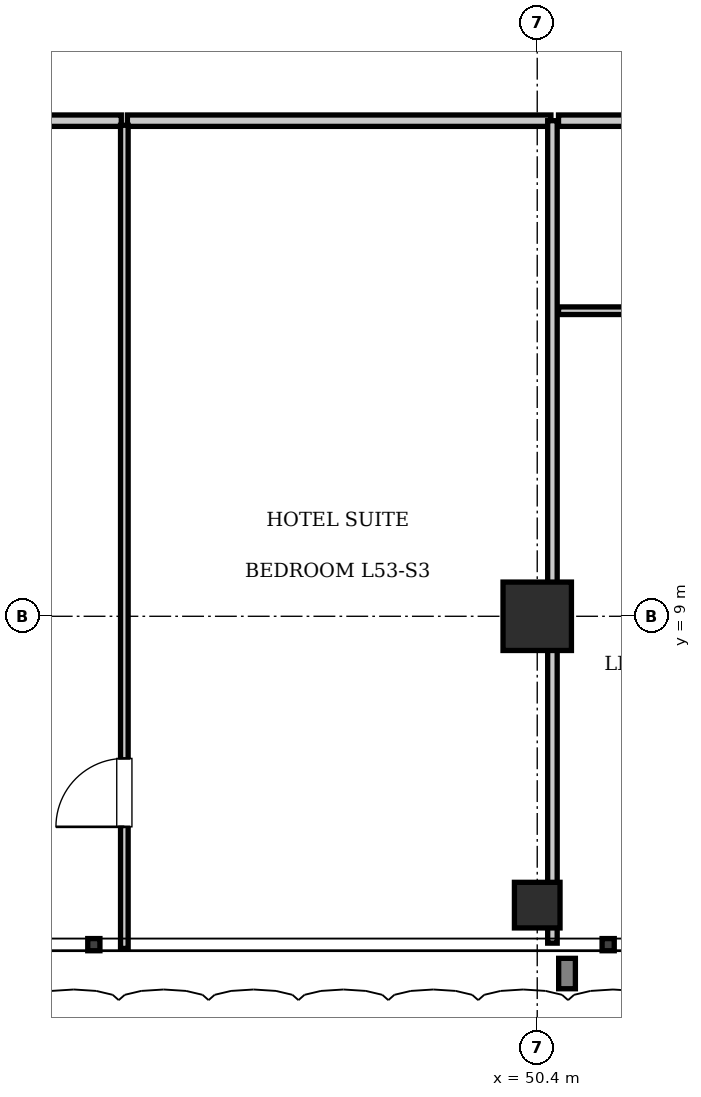
"""IFC4 building model, lengths in metres.
Left out: names, types, materials, properties, quantities, classifications, styles, units other than length and angle.
Written with IfcOpenShell. Run it as: python <this file> out.ifc"""

import sys

from ifc_helpers import new_model, si_unit, direction, frame, frame_2d, origin, origin_2d, place, context, subcontext, project, spatial, rectangle, i_section, extrude, element, fill, save


model = new_model("IFC4")
c1 = context("Model", 3, precision=1e-05, world=origin(), true_north=direction((0.0, 1.0)))
c2 = subcontext(c1, "Body", "Model", "MODEL_VIEW")
j1 = project(units=[si_unit("LENGTHUNIT", "METRE"), si_unit("PLANEANGLEUNIT", "RADIAN")], contexts=[c1])
p1 = place(None, origin())
s1 = spatial("IfcSite", under=j1, at=p1, CompositionType="ELEMENT")
p2 = place(p1, origin())
s2 = spatial("IfcBuilding", under=s1, at=p2, CompositionType="ELEMENT")
p3 = place(p2, frame((0.0, 0.0, 215.95)))
s3 = spatial("IfcBuildingStorey", under=s2, at=p3, CompositionType="ELEMENT", Elevation=215.95)
p4 = place(p3, frame((50.4, 9.0, 0.0), z_axis=(0.0, 0.0, 1.0), x_axis=(1.0, 0.0, 0.0)))
e1 = element("IfcColumn", 1, at=p4, inside=s3, PredefinedType="COLUMN", context=c2, shape_type="SweptSolid", body=[
    extrude(rectangle(XDim=0.9, YDim=0.9, at=origin_2d()), origin(), (0.0, 0.0, 1.0), 3.85),
])
p5 = place(p3, frame((50.4, 5.2, 0.0), z_axis=(0.0, 0.0, 1.0), x_axis=(1.0, 0.0, 0.0)))
e2 = element("IfcColumn", 2, at=p5, inside=s3, PredefinedType="COLUMN", context=c2, shape_type="SweptSolid", body=[
    extrude(i_section(OverallWidth=0.6, OverallDepth=0.6, WebThickness=0.025, FlangeThickness=0.038, at=origin_2d()), origin(), (0.0, 0.0, 1.0), 3.85),
])
p6 = place(p3, frame((40.15, 15.52, 0.0), z_axis=(0.0, 0.0, 1.0), x_axis=(1.0, 0.0, 0.0)))
e3 = element("IfcWall", 3, at=p6, inside=s3, PredefinedType="PARTITIONING", context=c2, shape_type="SweptSolid", body=[
    extrude(rectangle(XDim=4.778, YDim=0.15, at=frame_2d((2.389, 0.0))), origin(), (0.0, 0.0, 1.0), 3.61),
])
p7 = place(p6, frame((1.914, 0.0, 0.0)))
e4 = element("IfcOpeningElement", 4, at=p7, cuts=e3, PredefinedType="OPENING", context=c2, shape_type="SweptSolid", body=[
    extrude(rectangle(XDim=0.95, YDim=2.15, at=frame_2d((0.475, 1.075))), frame((0.0, 0.085, 0.0), z_axis=(0.0, -1.0, 0.0), x_axis=(1.0, 0.0, 0.0)), (0.0, 0.0, 1.0), 0.17),
])
p8 = place(p3, frame((45.008, 15.52, 0.0), z_axis=(0.0, 0.0, 1.0), x_axis=(1.0, 0.0, 0.0)))
e5 = element("IfcWall", 5, at=p8, inside=s3, PredefinedType="PARTITIONING", context=c2, shape_type="SweptSolid", body=[
    extrude(rectangle(XDim=5.572, YDim=0.15, at=frame_2d((2.786, 0.0))), origin(), (0.0, 0.0, 1.0), 3.61),
])
p9 = place(p3, frame((44.968, 4.63, 0.0), z_axis=(0.0, 0.0, 1.0), x_axis=(0.0, 1.0, 0.0)))
e6 = element("IfcWall", 6, at=p9, inside=s3, PredefinedType="PARTITIONING", context=c2, shape_type="SweptSolid", body=[
    extrude(rectangle(XDim=10.83, YDim=0.1, at=frame_2d((5.415, 0.0))), origin(), (0.0, 0.0, 1.0), 3.61),
])
p10 = place(p9, frame((1.6, 0.0, 0.0)))
e7 = element("IfcOpeningElement", 7, at=p10, cuts=e6, PredefinedType="OPENING", context=c2, shape_type="SweptSolid", body=[
    extrude(rectangle(XDim=0.9, YDim=2.1, at=frame_2d((0.45, 1.05))), frame((0.0, 0.06, 0.0), z_axis=(0.0, -1.0, 0.0), x_axis=(1.0, 0.0, 0.0)), (0.0, 0.0, 1.0), 0.12),
])
p11 = place(p3, frame((50.6, 4.7, 0.0), z_axis=(0.0, 0.0, 1.0), x_axis=(0.0, 1.0, 0.0)))
e8 = element("IfcWall", 8, at=p11, inside=s3, PredefinedType="PARTITIONING", context=c2, shape_type="SweptSolid", body=[
    extrude(rectangle(XDim=10.82, YDim=0.125, at=frame_2d((5.41, 0.0))), origin(), (0.0, 0.0, 1.0), 3.61),
])
p12 = place(p3, frame((50.68, 15.52, 0.0), z_axis=(0.0, 0.0, 1.0), x_axis=(1.0, 0.0, 0.0)))
e9 = element("IfcWall", 9, at=p12, inside=s3, PredefinedType="PARTITIONING", context=c2, shape_type="SweptSolid", body=[
    extrude(rectangle(XDim=2.27, YDim=0.15, at=frame_2d((1.135, 0.0))), origin(), (0.0, 0.0, 1.0), 3.61),
])
p13 = place(p3, frame((50.68, 13.02, 0.0), z_axis=(0.0, 0.0, 1.0), x_axis=(1.0, 0.0, 0.0)))
e10 = element("IfcWall", 10, at=p13, inside=s3, PredefinedType="PARTITIONING", context=c2, shape_type="SweptSolid", body=[
    extrude(rectangle(XDim=2.27, YDim=0.1, at=frame_2d((1.135, 0.0))), origin(), (0.0, 0.0, 1.0), 3.61),
])
p14 = place(p10, origin())
e11 = element("IfcDoor", 11, at=p14, inside=s3, OperationType="SINGLE_SWING_LEFT", PredefinedType="DOOR", context=c2, shape_type="SweptSolid", body=[
    extrude(rectangle(XDim=0.9, YDim=2.1, at=frame_2d((0.45, 1.05))), frame((0.0, 0.025, 0.0), z_axis=(0.0, -1.0, 0.0), x_axis=(1.0, 0.0, 0.0)), (0.0, 0.0, 1.0), 0.05),
])
fill(e7, e11)
save(model, sys.argv[1])
